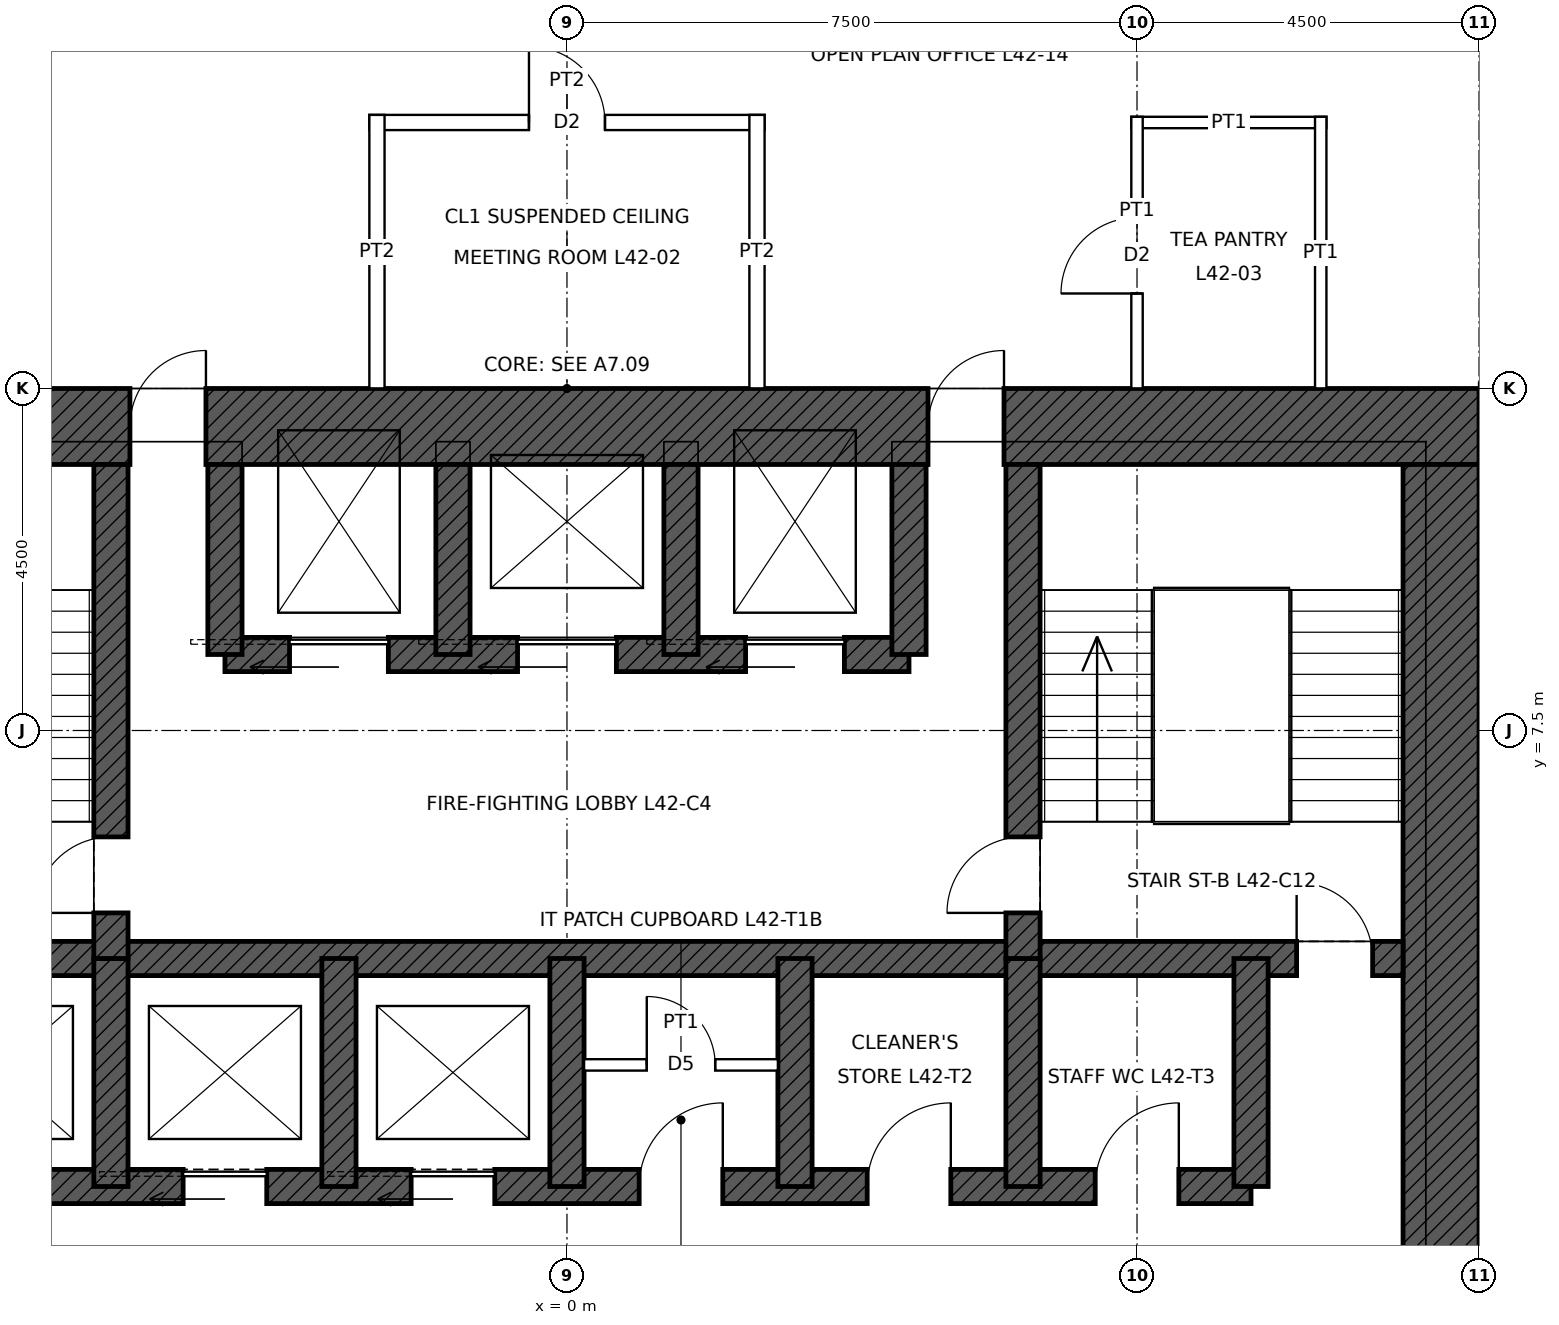
"""IFC4 building model, lengths in metres.
Left out: names, types, materials, properties, quantities, classifications, styles, units other than length and angle.
Written with IfcOpenShell. Run it as: python <this file> out.ifc"""

import sys

from ifc_helpers import new_model, si_unit, direction, frame, frame_2d, origin, place, context, subcontext, project, spatial, rectangle, extrude, element, fill, save


model = new_model("IFC4")
c1 = context("Model", 3, precision=1e-05, world=origin(), true_north=direction((0.0, 1.0)))
c2 = subcontext(c1, "Body", "Model", "MODEL_VIEW")
j1 = project(units=[si_unit("LENGTHUNIT", "METRE"), si_unit("PLANEANGLEUNIT", "RADIAN")], contexts=[c1])
p1 = place(None, origin())
s1 = spatial("IfcSite", under=j1, at=p1, CompositionType="ELEMENT")
p2 = place(p1, origin())
s2 = spatial("IfcBuilding", under=s1, at=p2, CompositionType="ELEMENT")
p3 = place(p2, frame((0.0, 0.0, 201.9)))
s3 = spatial("IfcBuildingStorey", under=s2, at=p3, CompositionType="ELEMENT", Elevation=201.9)
p4 = place(p3, frame((-12.0, 11.5, 0.0), z_axis=(0.0, 0.0, 1.0), x_axis=(1.0, 0.0, 0.0)))
e1 = element("IfcWall", 1, at=p4, inside=s3, PredefinedType="SHEAR", context=c2, shape_type="SweptSolid", body=[
    extrude(rectangle(XDim=24.0, YDim=1.0, at=frame_2d((12.0, 0.0))), origin(), (0.0, 0.0, 1.0), 4.0),
])
p5 = place(p4, frame((6.25, 0.0, 0.0)))
e2 = element("IfcOpeningElement", 2, at=p5, cuts=e1, PredefinedType="OPENING", context=c2, shape_type="SweptSolid", body=[
    extrude(rectangle(XDim=1.0, YDim=2.4, at=frame_2d((0.5, 1.2))), frame((0.0, 0.51, 0.0), z_axis=(0.0, -1.0, 0.0), x_axis=(1.0, 0.0, 0.0)), (0.0, 0.0, 1.0), 1.02),
])
p6 = place(p4, frame((16.75, 0.0, 0.0)))
e3 = element("IfcOpeningElement", 3, at=p6, cuts=e1, PredefinedType="OPENING", context=c2, shape_type="SweptSolid", body=[
    extrude(rectangle(XDim=1.0, YDim=2.4, at=frame_2d((0.5, 1.2))), frame((0.0, 0.51, 0.0), z_axis=(0.0, -1.0, 0.0), x_axis=(1.0, 0.0, 0.0)), (0.0, 0.0, 1.0), 1.02),
])
p7 = place(p3, frame((11.5, 11.0, 0.0), z_axis=(0.0, 0.0, 1.0), x_axis=(0.0, -1.0, 0.0)))
e4 = element("IfcWall", 4, at=p7, inside=s3, PredefinedType="SHEAR", context=c2, shape_type="SweptSolid", body=[
    extrude(rectangle(XDim=22.0, YDim=1.0, at=frame_2d((11.0, 0.0))), origin(), (0.0, 0.0, 1.0), 4.0),
])
p8 = place(p7, frame((10.5, 0.0, 0.0)))
e5 = element("IfcOpeningElement", 5, at=p8, cuts=e4, PredefinedType="OPENING", context=c2, shape_type="SweptSolid", body=[
    extrude(rectangle(XDim=1.0, YDim=2.4, at=frame_2d((0.5, 1.2))), frame((0.0, 0.51, 0.0), z_axis=(0.0, -1.0, 0.0), x_axis=(1.0, 0.0, 0.0)), (0.0, 0.0, 1.0), 1.02),
])
p9 = place(p3, frame((-11.0, 4.5, 0.0), z_axis=(0.0, 0.0, 1.0), x_axis=(1.0, 0.0, 0.0)))
e6 = element("IfcWall", 6, at=p9, inside=s3, PredefinedType="SHEAR", context=c2, shape_type="SweptSolid", body=[
    extrude(rectangle(XDim=22.0, YDim=0.45, at=frame_2d((11.0, 0.0))), origin(), (0.0, 0.0, 1.0), 4.0),
])
p10 = place(p9, frame((0.4, 0.0, 0.0)))
e7 = element("IfcOpeningElement", 7, at=p10, cuts=e6, PredefinedType="OPENING", context=c2, shape_type="SweptSolid", body=[
    extrude(rectangle(XDim=1.0, YDim=2.1, at=frame_2d((0.5, 1.05))), frame((0.0, 0.235, 0.0), z_axis=(0.0, -1.0, 0.0), x_axis=(1.0, 0.0, 0.0)), (0.0, 0.0, 1.0), 0.47),
])
p11 = place(p9, frame((20.6, 0.0, 0.0)))
e8 = element("IfcOpeningElement", 8, at=p11, cuts=e6, PredefinedType="OPENING", context=c2, shape_type="SweptSolid", body=[
    extrude(rectangle(XDim=1.0, YDim=2.1, at=frame_2d((0.5, 1.05))), frame((0.0, 0.235, 0.0), z_axis=(0.0, -1.0, 0.0), x_axis=(1.0, 0.0, 0.0)), (0.0, 0.0, 1.0), 0.47),
])
p12 = place(p3, frame((-9.0, 1.5, 0.0), z_axis=(0.0, 0.0, 1.0), x_axis=(1.0, 0.0, 0.0)))
e9 = element("IfcWall", 9, at=p12, inside=s3, PredefinedType="SHEAR", context=c2, shape_type="SweptSolid", body=[
    extrude(rectangle(XDim=18.0, YDim=0.45, at=frame_2d((9.0, 0.0))), origin(), (0.0, 0.0, 1.0), 4.0),
])
p13 = place(p12, frame((0.95, 0.0, 0.0)))
e10 = element("IfcOpeningElement", 10, at=p13, cuts=e9, PredefinedType="OPENING", context=c2, shape_type="SweptSolid", body=[
    extrude(rectangle(XDim=1.1, YDim=2.1, at=frame_2d((0.55, 1.05))), frame((0.0, 0.235, 0.0), z_axis=(0.0, -1.0, 0.0), x_axis=(1.0, 0.0, 0.0)), (0.0, 0.0, 1.0), 0.47),
])
p14 = place(p12, frame((3.95, 0.0, 0.0)))
e11 = element("IfcOpeningElement", 11, at=p14, cuts=e9, PredefinedType="OPENING", context=c2, shape_type="SweptSolid", body=[
    extrude(rectangle(XDim=1.1, YDim=2.1, at=frame_2d((0.55, 1.05))), frame((0.0, 0.235, 0.0), z_axis=(0.0, -1.0, 0.0), x_axis=(1.0, 0.0, 0.0)), (0.0, 0.0, 1.0), 0.47),
])
p15 = place(p12, frame((6.95, 0.0, 0.0)))
e12 = element("IfcOpeningElement", 12, at=p15, cuts=e9, PredefinedType="OPENING", context=c2, shape_type="SweptSolid", body=[
    extrude(rectangle(XDim=1.1, YDim=2.1, at=frame_2d((0.55, 1.05))), frame((0.0, 0.235, 0.0), z_axis=(0.0, -1.0, 0.0), x_axis=(1.0, 0.0, 0.0)), (0.0, 0.0, 1.0), 0.47),
])
p16 = place(p12, frame((9.95, 0.0, 0.0)))
e13 = element("IfcOpeningElement", 13, at=p16, cuts=e9, PredefinedType="OPENING", context=c2, shape_type="SweptSolid", body=[
    extrude(rectangle(XDim=1.1, YDim=2.1, at=frame_2d((0.55, 1.05))), frame((0.0, 0.235, 0.0), z_axis=(0.0, -1.0, 0.0), x_axis=(1.0, 0.0, 0.0)), (0.0, 0.0, 1.0), 0.47),
])
p17 = place(p12, frame((12.95, 0.0, 0.0)))
e14 = element("IfcOpeningElement", 14, at=p17, cuts=e9, PredefinedType="OPENING", context=c2, shape_type="SweptSolid", body=[
    extrude(rectangle(XDim=1.1, YDim=2.1, at=frame_2d((0.55, 1.05))), frame((0.0, 0.235, 0.0), z_axis=(0.0, -1.0, 0.0), x_axis=(1.0, 0.0, 0.0)), (0.0, 0.0, 1.0), 0.47),
])
p18 = place(p12, frame((15.95, 0.0, 0.0)))
e15 = element("IfcOpeningElement", 15, at=p18, cuts=e9, PredefinedType="OPENING", context=c2, shape_type="SweptSolid", body=[
    extrude(rectangle(XDim=1.1, YDim=2.1, at=frame_2d((0.55, 1.05))), frame((0.0, 0.235, 0.0), z_axis=(0.0, -1.0, 0.0), x_axis=(1.0, 0.0, 0.0)), (0.0, 0.0, 1.0), 0.47),
])
p19 = place(p3, frame((-4.5, 8.5, 0.0), z_axis=(0.0, 0.0, 1.0), x_axis=(1.0, 0.0, 0.0)))
e16 = element("IfcWall", 16, at=p19, inside=s3, PredefinedType="SHEAR", context=c2, shape_type="SweptSolid", body=[
    extrude(rectangle(XDim=9.0, YDim=0.45, at=frame_2d((4.5, 0.0))), origin(), (0.0, 0.0, 1.0), 4.0),
])
p20 = place(p19, frame((0.85, 0.0, 0.0)))
e17 = element("IfcOpeningElement", 17, at=p20, cuts=e16, PredefinedType="OPENING", context=c2, shape_type="SweptSolid", body=[
    extrude(rectangle(XDim=1.3, YDim=2.4, at=frame_2d((0.65, 1.2))), frame((0.0, 0.235, 0.0), z_axis=(0.0, -1.0, 0.0), x_axis=(1.0, 0.0, 0.0)), (0.0, 0.0, 1.0), 0.47),
])
p21 = place(p19, frame((6.85, 0.0, 0.0)))
e18 = element("IfcOpeningElement", 18, at=p21, cuts=e16, PredefinedType="OPENING", context=c2, shape_type="SweptSolid", body=[
    extrude(rectangle(XDim=1.3, YDim=2.4, at=frame_2d((0.65, 1.2))), frame((0.0, 0.235, 0.0), z_axis=(0.0, -1.0, 0.0), x_axis=(1.0, 0.0, 0.0)), (0.0, 0.0, 1.0), 0.47),
])
p22 = place(p19, frame((3.85, 0.0, 0.0)))
e19 = element("IfcOpeningElement", 19, at=p22, cuts=e16, PredefinedType="OPENING", context=c2, shape_type="SweptSolid", body=[
    extrude(rectangle(XDim=1.3, YDim=2.4, at=frame_2d((0.65, 1.2))), frame((0.0, 0.235, 0.0), z_axis=(0.0, -1.0, 0.0), x_axis=(1.0, 0.0, 0.0)), (0.0, 0.0, 1.0), 0.47),
])
for number, where, z_axis, x_axis in (
    (20, (9.0, 1.5, 0.0), (0.0, 0.0, 1.0), (0.0, 1.0, 0.0)),
    (21, (-6.0, 1.5, 0.0), (0.0, 0.0, 1.0), (0.0, 1.0, 0.0)),
    (22, (-3.0, 1.5, 0.0), (0.0, 0.0, 1.0), (0.0, 1.0, 0.0)),
    (23, (0.0, 1.5, 0.0), (0.0, 0.0, 1.0), (0.0, 1.0, 0.0)),
    (24, (3.0, 1.5, 0.0), (0.0, 0.0, 1.0), (0.0, 1.0, 0.0)),
    (25, (6.0, 1.5, 0.0), (0.0, 0.0, 1.0), (0.0, 1.0, 0.0)),
):
    element("IfcWall", number, at=place(p3, frame(where, z_axis=z_axis, x_axis=x_axis)), inside=s3, PredefinedType="SHEAR", context=c2, shape_type="SweptSolid", body=[
        extrude(rectangle(XDim=3.0, YDim=0.45, at=frame_2d((1.5, 0.0))), origin(), (0.0, 0.0, 1.0), 4.0),
    ])
p23 = place(p3, frame((-6.0, 4.5, 0.0), z_axis=(0.0, 0.0, 1.0), x_axis=(0.0, 1.0, 0.0)))
e26 = element("IfcWall", 26, at=p23, inside=s3, PredefinedType="SHEAR", context=c2, shape_type="SweptSolid", body=[
    extrude(rectangle(XDim=6.5, YDim=0.45, at=frame_2d((3.25, 0.0))), origin(), (0.0, 0.0, 1.0), 4.0),
])
p24 = place(p23, frame((0.6, 0.0, 0.0)))
e27 = element("IfcOpeningElement", 27, at=p24, cuts=e26, PredefinedType="OPENING", context=c2, shape_type="SweptSolid", body=[
    extrude(rectangle(XDim=1.0, YDim=2.1, at=frame_2d((0.5, 1.05))), frame((0.0, 0.235, 0.0), z_axis=(0.0, -1.0, 0.0), x_axis=(1.0, 0.0, 0.0)), (0.0, 0.0, 1.0), 0.47),
])
p25 = place(p3, frame((6.0, 4.5, 0.0), z_axis=(0.0, 0.0, 1.0), x_axis=(0.0, 1.0, 0.0)))
e28 = element("IfcWall", 28, at=p25, inside=s3, PredefinedType="SHEAR", context=c2, shape_type="SweptSolid", body=[
    extrude(rectangle(XDim=6.5, YDim=0.45, at=frame_2d((3.25, 0.0))), origin(), (0.0, 0.0, 1.0), 4.0),
])
p26 = place(p25, frame((0.6, 0.0, 0.0)))
e29 = element("IfcOpeningElement", 29, at=p26, cuts=e28, PredefinedType="OPENING", context=c2, shape_type="SweptSolid", body=[
    extrude(rectangle(XDim=1.0, YDim=2.1, at=frame_2d((0.5, 1.05))), frame((0.0, 0.235, 0.0), z_axis=(0.0, -1.0, 0.0), x_axis=(1.0, 0.0, 0.0)), (0.0, 0.0, 1.0), 0.47),
])
for number, where, z_axis, x_axis in (
    (30, (-4.5, 8.5, 0.0), (0.0, 0.0, 1.0), (0.0, 1.0, 0.0)),
    (31, (4.5, 8.5, 0.0), (0.0, 0.0, 1.0), (0.0, 1.0, 0.0)),
    (32, (-1.5, 8.5, 0.0), (0.0, 0.0, 1.0), (0.0, 1.0, 0.0)),
    (33, (1.5, 8.5, 0.0), (0.0, 0.0, 1.0), (0.0, 1.0, 0.0)),
):
    element("IfcWall", number, at=place(p3, frame(where, z_axis=z_axis, x_axis=x_axis)), inside=s3, PredefinedType="SHEAR", context=c2, shape_type="SweptSolid", body=[
        extrude(rectangle(XDim=2.5, YDim=0.45, at=frame_2d((1.25, 0.0))), origin(), (0.0, 0.0, 1.0), 4.0),
    ])
p27 = place(p3, frame((-2.6, 15.5, 0.0), z_axis=(0.0, 0.0, 1.0), x_axis=(1.0, 0.0, 0.0)))
e34 = element("IfcWall", 34, at=p27, inside=s3, PredefinedType="PARTITIONING", context=c2, shape_type="SweptSolid", body=[
    extrude(rectangle(XDim=5.2, YDim=0.2, at=frame_2d((2.6, 0.0))), origin(), (0.0, 0.0, 1.0), 3.85),
])
p28 = place(p27, frame((2.1, 0.0, 0.0)))
e35 = element("IfcOpeningElement", 35, at=p28, cuts=e34, PredefinedType="OPENING", context=c2, shape_type="SweptSolid", body=[
    extrude(rectangle(XDim=1.0, YDim=2.1, at=frame_2d((0.5, 1.05))), frame((0.0, 0.11, 0.0), z_axis=(0.0, -1.0, 0.0), x_axis=(1.0, 0.0, 0.0)), (0.0, 0.0, 1.0), 0.22),
])
p29 = place(p3, frame((7.425, 15.5, 0.0), z_axis=(0.0, 0.0, 1.0), x_axis=(1.0, 0.0, 0.0)))
e36 = element("IfcWall", 36, at=p29, inside=s3, PredefinedType="PARTITIONING", context=c2, shape_type="SweptSolid", body=[
    extrude(rectangle(XDim=2.567, YDim=0.15, at=frame_2d((1.283, 0.0))), origin(), (0.0, 0.0, 1.0), 3.85),
])
for number, where, z_axis, x_axis in (
    (37, (-2.5, 12.0, 0.0), (0.0, 0.0, 1.0), (0.0, 1.0, 0.0)),
    (38, (2.5, 12.0, 0.0), (0.0, 0.0, 1.0), (0.0, 1.0, 0.0)),
):
    element("IfcWall", number, at=place(p3, frame(where, z_axis=z_axis, x_axis=x_axis)), inside=s3, PredefinedType="PARTITIONING", context=c2, shape_type="SweptSolid", body=[
        extrude(rectangle(XDim=3.6, YDim=0.2, at=frame_2d((1.8, 0.0))), origin(), (0.0, 0.0, 1.0), 3.85),
    ])
p30 = place(p3, frame((7.5, 12.0, 0.0), z_axis=(0.0, 0.0, 1.0), x_axis=(0.0, 1.0, 0.0)))
e39 = element("IfcWall", 39, at=p30, inside=s3, PredefinedType="PARTITIONING", context=c2, shape_type="SweptSolid", body=[
    extrude(rectangle(XDim=3.575, YDim=0.15, at=frame_2d((1.788, 0.0))), origin(), (0.0, 0.0, 1.0), 3.238),
])
p31 = place(p30, frame((1.25, 0.0, 0.0)))
e40 = element("IfcOpeningElement", 40, at=p31, cuts=e39, PredefinedType="OPENING", context=c2, shape_type="SweptSolid", body=[
    extrude(rectangle(XDim=1.0, YDim=2.1, at=frame_2d((0.5, 1.05))), frame((0.0, 0.085, 0.0), z_axis=(0.0, -1.0, 0.0), x_axis=(1.0, 0.0, 0.0)), (0.0, 0.0, 1.0), 0.17),
])
p32 = place(p3, frame((9.917, 12.0, 0.0), z_axis=(0.0, 0.0, 1.0), x_axis=(0.0, 1.0, 0.0)))
e41 = element("IfcWall", 41, at=p32, inside=s3, PredefinedType="PARTITIONING", context=c2, shape_type="SweptSolid", body=[
    extrude(rectangle(XDim=3.575, YDim=0.15, at=frame_2d((1.788, 0.0))), origin(), (0.0, 0.0, 1.0), 3.85),
])
p33 = place(p3, frame((0.225, 3.1, 0.0), z_axis=(0.0, 0.0, 1.0), x_axis=(1.0, 0.0, 0.0)))
e42 = element("IfcWall", 42, at=p33, inside=s3, PredefinedType="PARTITIONING", context=c2, shape_type="SweptSolid", body=[
    extrude(rectangle(XDim=2.55, YDim=0.15, at=frame_2d((1.275, 0.0))), origin(), (0.0, 0.0, 1.0), 3.75),
])
p34 = place(p33, frame((0.825, 0.0, 0.0)))
e43 = element("IfcOpeningElement", 43, at=p34, cuts=e42, PredefinedType="OPENING", context=c2, shape_type="SweptSolid", body=[
    extrude(rectangle(XDim=0.9, YDim=2.1, at=frame_2d((0.45, 1.05))), frame((0.0, 0.085, 0.0), z_axis=(0.0, -1.0, 0.0), x_axis=(1.0, 0.0, 0.0)), (0.0, 0.0, 1.0), 0.17),
])
p35 = place(p11, origin())
e44 = element("IfcDoor", 44, at=p35, inside=s3, OperationType="SINGLE_SWING_LEFT", PredefinedType="DOOR", context=c2, shape_type="SweptSolid", body=[
    extrude(rectangle(XDim=1.0, YDim=2.1, at=frame_2d((0.5, 1.05))), frame((0.0, 0.025, 0.0), z_axis=(0.0, -1.0, 0.0), x_axis=(1.0, 0.0, 0.0)), (0.0, 0.0, 1.0), 0.05),
])
fill(e8, e44)
p36 = place(p24, origin())
e45 = element("IfcDoor", 45, at=p36, inside=s3, OperationType="SINGLE_SWING_LEFT", PredefinedType="DOOR", context=c2, shape_type="SweptSolid", body=[
    extrude(rectangle(XDim=1.0, YDim=2.1, at=frame_2d((0.5, 1.05))), frame((0.0, 0.025, 0.0), z_axis=(0.0, -1.0, 0.0), x_axis=(1.0, 0.0, 0.0)), (0.0, 0.0, 1.0), 0.05),
])
fill(e27, e45)
p37 = place(p26, origin())
e46 = element("IfcDoor", 46, at=p37, inside=s3, OperationType="SINGLE_SWING_LEFT", PredefinedType="DOOR", context=c2, shape_type="SweptSolid", body=[
    extrude(rectangle(XDim=1.0, YDim=2.1, at=frame_2d((0.5, 1.05))), frame((0.0, 0.025, 0.0), z_axis=(0.0, -1.0, 0.0), x_axis=(1.0, 0.0, 0.0)), (0.0, 0.0, 1.0), 0.05),
])
fill(e29, e46)
p38 = place(p5, origin())
e47 = element("IfcDoor", 47, at=p38, inside=s3, OperationType="SINGLE_SWING_RIGHT", PredefinedType="DOOR", context=c2, shape_type="SweptSolid", body=[
    extrude(rectangle(XDim=1.0, YDim=2.4, at=frame_2d((0.5, 1.2))), frame((0.0, 0.485, 0.0), z_axis=(0.0, -1.0, 0.0), x_axis=(1.0, 0.0, 0.0)), (0.0, 0.0, 1.0), 0.05),
])
fill(e2, e47)
p39 = place(p6, origin())
e48 = element("IfcDoor", 48, at=p39, inside=s3, OperationType="SINGLE_SWING_RIGHT", PredefinedType="DOOR", context=c2, shape_type="SweptSolid", body=[
    extrude(rectangle(XDim=1.0, YDim=2.4, at=frame_2d((0.5, 1.2))), frame((0.0, 0.485, 0.0), z_axis=(0.0, -1.0, 0.0), x_axis=(1.0, 0.0, 0.0)), (0.0, 0.0, 1.0), 0.05),
])
fill(e3, e48)
p40 = place(p20, origin())
e49 = element("IfcDoor", 49, at=p40, inside=s3, OperationType="SLIDING_TO_LEFT", PredefinedType="DOOR", context=c2, shape_type="SweptSolid", body=[
    extrude(rectangle(XDim=1.3, YDim=2.4, at=frame_2d((0.65, 1.2))), frame((0.0, 0.025, 0.0), z_axis=(0.0, -1.0, 0.0), x_axis=(1.0, 0.0, 0.0)), (0.0, 0.0, 1.0), 0.05),
])
fill(e17, e49)
p41 = place(p21, origin())
e50 = element("IfcDoor", 50, at=p41, inside=s3, OperationType="SLIDING_TO_LEFT", PredefinedType="DOOR", context=c2, shape_type="SweptSolid", body=[
    extrude(rectangle(XDim=1.3, YDim=2.4, at=frame_2d((0.65, 1.2))), frame((0.0, 0.025, 0.0), z_axis=(0.0, -1.0, 0.0), x_axis=(1.0, 0.0, 0.0)), (0.0, 0.0, 1.0), 0.05),
])
fill(e18, e50)
p42 = place(p22, origin())
e51 = element("IfcDoor", 51, at=p42, inside=s3, OperationType="SLIDING_TO_LEFT", PredefinedType="DOOR", context=c2, shape_type="SweptSolid", body=[
    extrude(rectangle(XDim=1.3, YDim=2.4, at=frame_2d((0.65, 1.2))), frame((0.0, 0.025, 0.0), z_axis=(0.0, -1.0, 0.0), x_axis=(1.0, 0.0, 0.0)), (0.0, 0.0, 1.0), 0.05),
])
fill(e19, e51)
p43 = place(p14, origin())
e52 = element("IfcDoor", 52, at=p43, inside=s3, OperationType="SLIDING_TO_LEFT", PredefinedType="DOOR", context=c2, shape_type="SweptSolid", body=[
    extrude(rectangle(XDim=1.1, YDim=2.1, at=frame_2d((0.55, 1.05))), frame((0.0, 0.025, 0.0), z_axis=(0.0, -1.0, 0.0), x_axis=(1.0, 0.0, 0.0)), (0.0, 0.0, 1.0), 0.05),
])
fill(e11, e52)
p44 = place(p15, origin())
e53 = element("IfcDoor", 53, at=p44, inside=s3, OperationType="SLIDING_TO_LEFT", PredefinedType="DOOR", context=c2, shape_type="SweptSolid", body=[
    extrude(rectangle(XDim=1.1, YDim=2.1, at=frame_2d((0.55, 1.05))), frame((0.0, 0.025, 0.0), z_axis=(0.0, -1.0, 0.0), x_axis=(1.0, 0.0, 0.0)), (0.0, 0.0, 1.0), 0.05),
])
fill(e12, e53)
p45 = place(p16, origin())
e54 = element("IfcDoor", 54, at=p45, inside=s3, OperationType="SINGLE_SWING_RIGHT", PredefinedType="DOOR", context=c2, shape_type="SweptSolid", body=[
    extrude(rectangle(XDim=1.1, YDim=2.1, at=frame_2d((0.55, 1.05))), frame((0.0, 0.025, 0.0), z_axis=(0.0, -1.0, 0.0), x_axis=(1.0, 0.0, 0.0)), (0.0, 0.0, 1.0), 0.05),
])
fill(e13, e54)
p46 = place(p34, origin())
e55 = element("IfcDoor", 55, at=p46, inside=s3, OperationType="SINGLE_SWING_LEFT", PredefinedType="DOOR", context=c2, shape_type="SweptSolid", body=[
    extrude(rectangle(XDim=0.9, YDim=2.1, at=frame_2d((0.45, 1.05))), frame((0.0, 0.025, 0.0), z_axis=(0.0, -1.0, 0.0), x_axis=(1.0, 0.0, 0.0)), (0.0, 0.0, 1.0), 0.05),
])
fill(e43, e55)
p47 = place(p17, origin())
e56 = element("IfcDoor", 56, at=p47, inside=s3, OperationType="SINGLE_SWING_RIGHT", PredefinedType="DOOR", context=c2, shape_type="SweptSolid", body=[
    extrude(rectangle(XDim=1.1, YDim=2.1, at=frame_2d((0.55, 1.05))), frame((0.0, 0.025, 0.0), z_axis=(0.0, -1.0, 0.0), x_axis=(1.0, 0.0, 0.0)), (0.0, 0.0, 1.0), 0.05),
])
fill(e14, e56)
p48 = place(p18, origin())
e57 = element("IfcDoor", 57, at=p48, inside=s3, OperationType="SINGLE_SWING_RIGHT", PredefinedType="DOOR", context=c2, shape_type="SweptSolid", body=[
    extrude(rectangle(XDim=1.1, YDim=2.1, at=frame_2d((0.55, 1.05))), frame((0.0, 0.025, 0.0), z_axis=(0.0, -1.0, 0.0), x_axis=(1.0, 0.0, 0.0)), (0.0, 0.0, 1.0), 0.05),
])
fill(e15, e57)
p49 = place(p28, origin())
e58 = element("IfcDoor", 58, at=p49, inside=s3, OperationType="SINGLE_SWING_LEFT", PredefinedType="DOOR", context=c2, shape_type="SweptSolid", body=[
    extrude(rectangle(XDim=1.0, YDim=2.1, at=frame_2d((0.5, 1.05))), frame((0.0, 0.025, 0.0), z_axis=(0.0, -1.0, 0.0), x_axis=(1.0, 0.0, 0.0)), (0.0, 0.0, 1.0), 0.05),
])
fill(e35, e58)
p50 = place(p31, origin())
e59 = element("IfcDoor", 59, at=p50, inside=s3, OperationType="SINGLE_SWING_LEFT", PredefinedType="DOOR", context=c2, shape_type="SweptSolid", body=[
    extrude(rectangle(XDim=1.0, YDim=2.1, at=frame_2d((0.5, 1.05))), frame((0.0, 0.025, 0.0), z_axis=(0.0, -1.0, 0.0), x_axis=(1.0, 0.0, 0.0)), (0.0, 0.0, 1.0), 0.05),
])
fill(e40, e59)
save(model, sys.argv[1])
